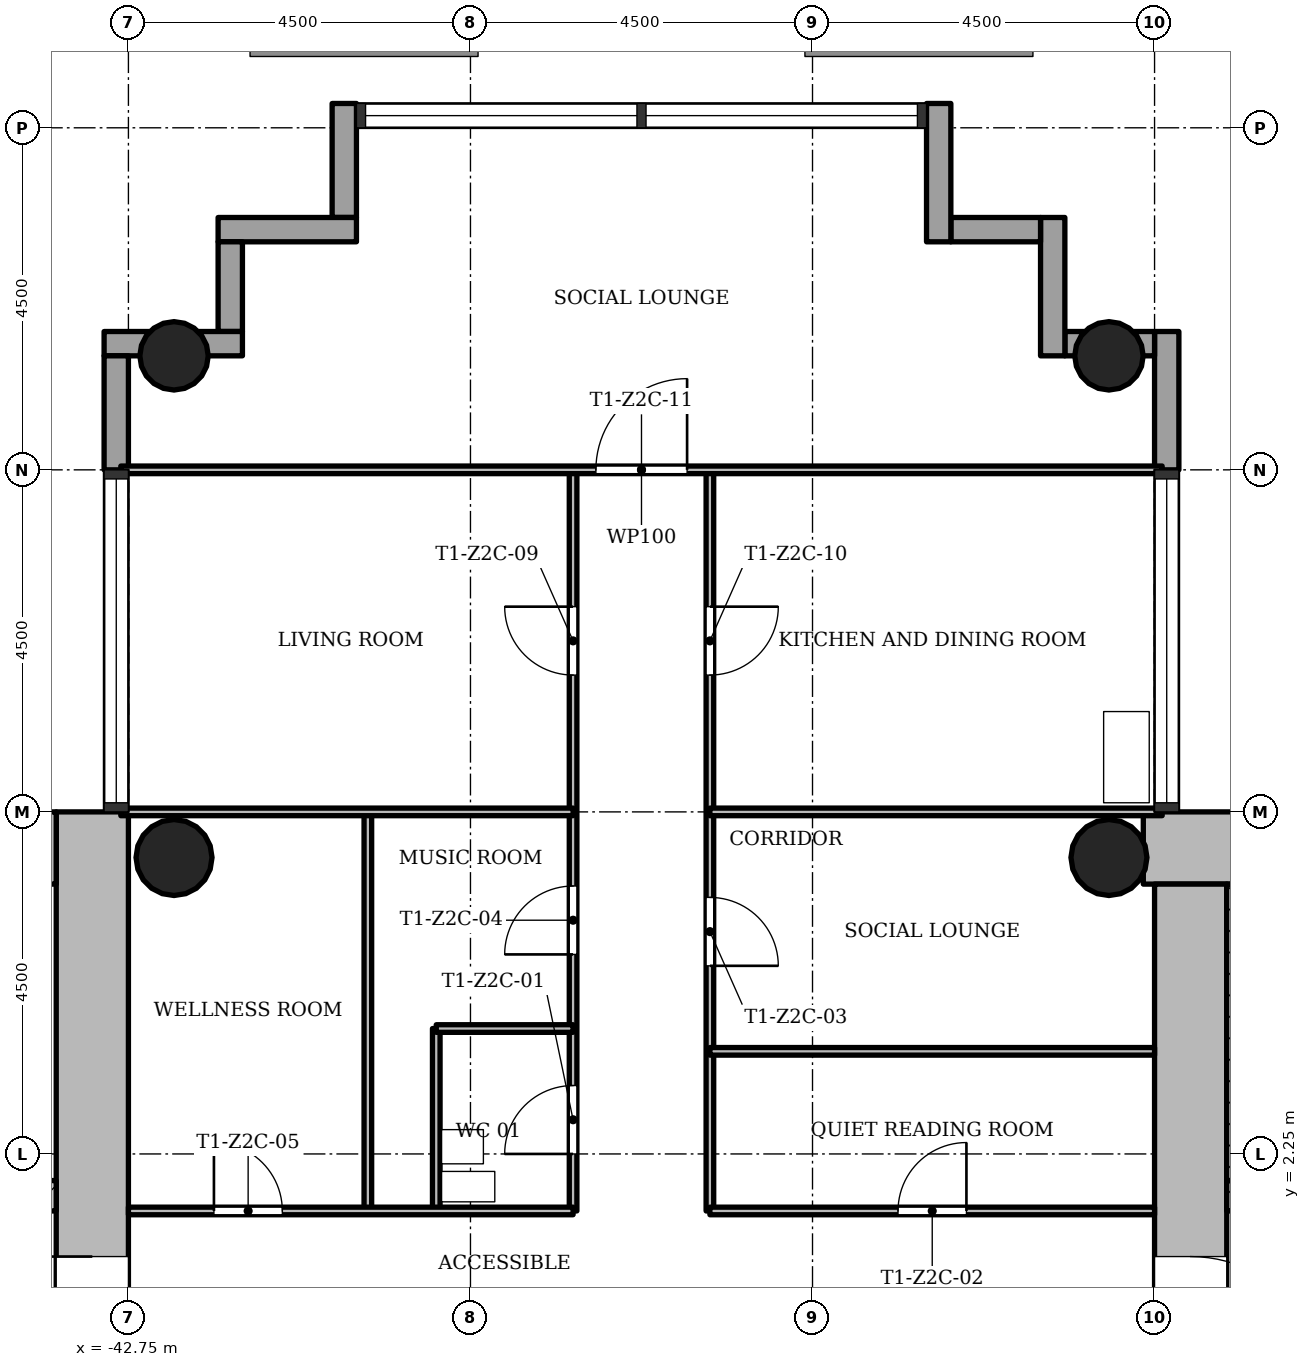
"""IFC4 building model, lengths in metres.
Left out: names, types, materials, properties, quantities, classifications, styles, units other than length and angle.
Written with IfcOpenShell. Run it as: python <this file> out.ifc"""

import sys

from ifc_helpers import new_model, si_unit, direction, frame, frame_2d, origin, origin_2d, place, context, subcontext, project, spatial, rectangle, hollow_circle, extrude, element, fill, save


model = new_model("IFC4")
c1 = context("Model", 3, precision=1e-05, world=origin(), true_north=direction((0.0, 1.0)))
c2 = subcontext(c1, "Body", "Model", "MODEL_VIEW")
j1 = project(units=[si_unit("LENGTHUNIT", "METRE"), si_unit("PLANEANGLEUNIT", "RADIAN")], contexts=[c1])
p1 = place(None, origin())
s1 = spatial("IfcSite", under=j1, at=p1, CompositionType="ELEMENT")
p2 = place(p1, origin())
s2 = spatial("IfcBuilding", under=s1, at=p2, CompositionType="ELEMENT")
p3 = place(p2, frame((0.0, 0.0, 86.8)))
s3 = spatial("IfcBuildingStorey", under=s2, at=p3, CompositionType="ELEMENT", Elevation=86.8)
p4 = place(p3, frame((-20.702, 6.275, 0.0), z_axis=(0.0, 0.0, 1.0), x_axis=(-1.0, 0.0, 0.0)))
e1 = element("IfcWall", 1, at=p4, inside=s3, PredefinedType="SHEAR", context=c2, shape_type="SweptSolid", body=[
    extrude(rectangle(XDim=8.696, YDim=0.95, at=frame_2d((4.348, 0.0))), origin(), (0.0, 0.0, 1.0), 3.4),
])
p5 = place(p3, frame((-28.775, 5.8, 0.0), z_axis=(0.0, 0.0, 1.0), x_axis=(0.0, -1.0, 0.0)))
e2 = element("IfcWall", 2, at=p5, inside=s3, PredefinedType="SHEAR", context=c2, shape_type="SweptSolid", body=[
    extrude(rectangle(XDim=12.55, YDim=0.95, at=frame_2d((6.275, 0.0))), origin(), (0.0, 0.0, 1.0), 3.4),
])
p6 = place(p5, frame((4.9, 0.0, 0.0)))
e3 = element("IfcOpeningElement", 3, at=p6, cuts=e2, PredefinedType="OPENING", context=c2, shape_type="SweptSolid", body=[
    extrude(rectangle(XDim=1.8, YDim=2.1, at=frame_2d((0.9, 1.05))), frame((0.0, 0.485, 0.0), z_axis=(0.0, -1.0, 0.0), x_axis=(1.0, 0.0, 0.0)), (0.0, 0.0, 1.0), 0.97),
])
p7 = place(p3, frame((-28.3, 1.7, 0.0), z_axis=(0.0, 0.0, 1.0), x_axis=(1.0, 0.0, 0.0)))
e4 = element("IfcWall", 4, at=p7, inside=s3, PredefinedType="SHEAR", context=c2, shape_type="SweptSolid", body=[
    extrude(rectangle(XDim=7.1, YDim=0.4, at=frame_2d((3.55, 0.0))), origin(), (0.0, 0.0, 1.0), 3.4),
])
p8 = place(p7, frame((0.7, 0.0, 0.0)))
e5 = element("IfcOpeningElement", 5, at=p8, cuts=e4, PredefinedType="OPENING", context=c2, shape_type="SweptSolid", body=[
    extrude(rectangle(XDim=0.9, YDim=2.1, at=frame_2d((0.45, 1.05))), frame((0.0, 0.21, 0.0), z_axis=(0.0, -1.0, 0.0), x_axis=(1.0, 0.0, 0.0)), (0.0, 0.0, 1.0), 0.42),
])
p9 = place(p3, frame((-43.225, -5.8, 0.0), z_axis=(0.0, 0.0, 1.0), x_axis=(0.0, 1.0, 0.0)))
e6 = element("IfcWall", 6, at=p9, inside=s3, PredefinedType="SHEAR", context=c2, shape_type="SweptSolid", body=[
    extrude(rectangle(XDim=12.55, YDim=0.95, at=frame_2d((6.275, 0.0))), origin(), (0.0, 0.0, 1.0), 3.4),
])
p10 = place(p9, frame((4.9, 0.0, 0.0)))
e7 = element("IfcOpeningElement", 7, at=p10, cuts=e6, PredefinedType="OPENING", context=c2, shape_type="SweptSolid", body=[
    extrude(rectangle(XDim=1.8, YDim=2.1, at=frame_2d((0.9, 1.05))), frame((0.0, 0.485, 0.0), z_axis=(0.0, -1.0, 0.0), x_axis=(1.0, 0.0, 0.0)), (0.0, 0.0, 1.0), 0.97),
])
p11 = place(p3, frame((-43.7, 6.275, 0.0), z_axis=(0.0, 0.0, 1.0), x_axis=(-1.0, 0.0, 0.0)))
e8 = element("IfcWall", 8, at=p11, inside=s3, PredefinedType="SHEAR", context=c2, shape_type="SweptSolid", body=[
    extrude(rectangle(XDim=8.05, YDim=0.95, at=frame_2d((4.025, 0.0))), origin(), (0.0, 0.0, 1.0), 3.4),
])
p12 = place(p3, frame((-50.8, 1.7, 0.0), z_axis=(0.0, 0.0, 1.0), x_axis=(1.0, 0.0, 0.0)))
e9 = element("IfcWall", 9, at=p12, inside=s3, PredefinedType="SHEAR", context=c2, shape_type="SweptSolid", body=[
    extrude(rectangle(XDim=7.1, YDim=0.4, at=frame_2d((3.55, 0.0))), origin(), (0.0, 0.0, 1.0), 3.4),
])
p13 = place(p12, frame((5.2, 0.0, 0.0)))
e10 = element("IfcOpeningElement", 10, at=p13, cuts=e9, PredefinedType="OPENING", context=c2, shape_type="SweptSolid", body=[
    extrude(rectangle(XDim=1.1, YDim=2.1, at=frame_2d((0.55, 1.05))), frame((0.0, 0.21, 0.0), z_axis=(0.0, -1.0, 0.0), x_axis=(1.0, 0.0, 0.0)), (0.0, 0.0, 1.0), 0.42),
])
for number, where, z_axis, x_axis in (
    (11, (-29.85, 12.75, 0.0), (0.0, 0.0, 1.0), (1.0, 0.0, 0.0)),
    (12, (-42.15, 12.75, 0.0), (0.0, 0.0, 1.0), (1.0, 0.0, 0.0)),
):
    element("IfcColumn", number, at=place(p3, frame(where, z_axis=z_axis, x_axis=x_axis)), inside=s3, PredefinedType="COLUMN", context=c2, shape_type="SweptSolid", body=[
        extrude(hollow_circle(Radius=0.45, WallThickness=0.032, at=origin_2d()), origin(), (0.0, 0.0, 1.0), 3.4),
    ])
for number, where, z_axis, x_axis in (
    (13, (-29.85, 6.15, 0.0), (0.0, 0.0, 1.0), (1.0, 0.0, 0.0)),
    (14, (-42.15, 6.15, 0.0), (0.0, 0.0, 1.0), (1.0, 0.0, 0.0)),
):
    element("IfcColumn", number, at=place(p3, frame(where, z_axis=z_axis, x_axis=x_axis)), inside=s3, PredefinedType="COLUMN", context=c2, shape_type="SweptSolid", body=[
        extrude(hollow_circle(Radius=0.5, WallThickness=0.036, at=origin_2d()), origin(), (0.0, 0.0, 1.0), 3.4),
    ])
p14 = place(p3, frame((-29.09, 11.25, -0.3), z_axis=(0.0, 0.0, 1.0), x_axis=(0.0, 1.0, 0.0)))
e15 = element("IfcWall", 15, at=p14, inside=s3, PredefinedType="STANDARD", context=c2, shape_type="SweptSolid", body=[
    extrude(rectangle(XDim=1.82, YDim=0.32, at=frame_2d((0.91, 0.0))), origin(), (0.0, 0.0, 1.0), 3.4),
])
p15 = place(p3, frame((-29.25, 12.91, -0.3), z_axis=(0.0, 0.0, 1.0), x_axis=(-1.0, 0.0, 0.0)))
e16 = element("IfcWall", 16, at=p15, inside=s3, PredefinedType="STANDARD", context=c2, shape_type="SweptSolid", body=[
    extrude(rectangle(XDim=1.18, YDim=0.32, at=frame_2d((0.59, 0.0))), origin(), (0.0, 0.0, 1.0), 3.4),
])
p16 = place(p3, frame((-30.59, 12.75, -0.3), z_axis=(0.0, 0.0, 1.0), x_axis=(0.0, 1.0, 0.0)))
e17 = element("IfcWall", 17, at=p16, inside=s3, PredefinedType="STANDARD", context=c2, shape_type="SweptSolid", body=[
    extrude(rectangle(XDim=1.82, YDim=0.32, at=frame_2d((0.91, 0.0))), origin(), (0.0, 0.0, 1.0), 3.4),
])
p17 = place(p3, frame((-30.75, 14.41, -0.3), z_axis=(0.0, 0.0, 1.0), x_axis=(-1.0, 0.0, 0.0)))
e18 = element("IfcWall", 18, at=p17, inside=s3, PredefinedType="STANDARD", context=c2, shape_type="SweptSolid", body=[
    extrude(rectangle(XDim=1.18, YDim=0.32, at=frame_2d((0.59, 0.0))), origin(), (0.0, 0.0, 1.0), 3.4),
])
p18 = place(p3, frame((-32.09, 14.25, -0.3), z_axis=(0.0, 0.0, 1.0), x_axis=(0.0, 1.0, 0.0)))
e19 = element("IfcWall", 19, at=p18, inside=s3, PredefinedType="STANDARD", context=c2, shape_type="SweptSolid", body=[
    extrude(rectangle(XDim=1.82, YDim=0.32, at=frame_2d((0.91, 0.0))), origin(), (0.0, 0.0, 1.0), 3.4),
])
p19 = place(p3, frame((-39.91, 16.07, -0.3), z_axis=(0.0, 0.0, 1.0), x_axis=(0.0, -1.0, 0.0)))
e20 = element("IfcWall", 20, at=p19, inside=s3, PredefinedType="STANDARD", context=c2, shape_type="SweptSolid", body=[
    extrude(rectangle(XDim=1.5, YDim=0.32, at=frame_2d((0.75, 0.0))), origin(), (0.0, 0.0, 1.0), 3.4),
])
p20 = place(p3, frame((-39.75, 14.41, -0.3), z_axis=(0.0, 0.0, 1.0), x_axis=(-1.0, 0.0, 0.0)))
e21 = element("IfcWall", 21, at=p20, inside=s3, PredefinedType="STANDARD", context=c2, shape_type="SweptSolid", body=[
    extrude(rectangle(XDim=1.82, YDim=0.32, at=frame_2d((0.91, 0.0))), origin(), (0.0, 0.0, 1.0), 3.4),
])
p21 = place(p3, frame((-41.41, 14.25, -0.3), z_axis=(0.0, 0.0, 1.0), x_axis=(0.0, -1.0, 0.0)))
e22 = element("IfcWall", 22, at=p21, inside=s3, PredefinedType="STANDARD", context=c2, shape_type="SweptSolid", body=[
    extrude(rectangle(XDim=1.18, YDim=0.32, at=frame_2d((0.59, 0.0))), origin(), (0.0, 0.0, 1.0), 3.4),
])
p22 = place(p3, frame((-41.25, 12.91, -0.3), z_axis=(0.0, 0.0, 1.0), x_axis=(-1.0, 0.0, 0.0)))
e23 = element("IfcWall", 23, at=p22, inside=s3, PredefinedType="STANDARD", context=c2, shape_type="SweptSolid", body=[
    extrude(rectangle(XDim=1.82, YDim=0.32, at=frame_2d((0.91, 0.0))), origin(), (0.0, 0.0, 1.0), 3.4),
])
p23 = place(p3, frame((-42.91, 12.75, -0.3), z_axis=(0.0, 0.0, 1.0), x_axis=(0.0, -1.0, 0.0)))
e24 = element("IfcWall", 24, at=p23, inside=s3, PredefinedType="STANDARD", context=c2, shape_type="SweptSolid", body=[
    extrude(rectangle(XDim=1.5, YDim=0.32, at=frame_2d((0.75, 0.0))), origin(), (0.0, 0.0, 1.0), 3.4),
])
p24 = place(p3, frame((-39.6, 1.5, 0.0), z_axis=(0.0, 0.0, 1.0), x_axis=(0.0, 1.0, 0.0)))
e25 = element("IfcWall", 25, at=p24, inside=s3, PredefinedType="PARTITIONING", context=c2, shape_type="SweptSolid", body=[
    extrude(rectangle(XDim=5.25, YDim=0.1, at=frame_2d((2.625, 0.0))), origin(), (0.0, 0.0, 1.0), 3.0),
])
p25 = place(p3, frame((-38.7, 1.5, 0.0), z_axis=(0.0, 0.0, 1.0), x_axis=(0.0, 1.0, 0.0)))
e26 = element("IfcWall", 26, at=p25, inside=s3, PredefinedType="PARTITIONING", context=c2, shape_type="SweptSolid", body=[
    extrude(rectangle(XDim=2.4, YDim=0.1, at=frame_2d((1.2, 0.0))), origin(), (0.0, 0.0, 1.0), 3.0),
])
p26 = place(p3, frame((-36.9, 1.5, 0.0), z_axis=(0.0, 0.0, 1.0), x_axis=(0.0, 1.0, 0.0)))
e27 = element("IfcWall", 27, at=p26, inside=s3, PredefinedType="PARTITIONING", context=c2, shape_type="SweptSolid", body=[
    extrude(rectangle(XDim=9.75, YDim=0.1, at=frame_2d((4.875, 0.0))), origin(), (0.0, 0.0, 1.0), 3.0),
])
p27 = place(p26, frame((0.75, 0.0, 0.0)))
e28 = element("IfcOpeningElement", 28, at=p27, cuts=e27, PredefinedType="OPENING", context=c2, shape_type="SweptSolid", body=[
    extrude(rectangle(XDim=0.9, YDim=2.1, at=frame_2d((0.45, 1.05))), frame((0.0, 0.06, 0.0), z_axis=(0.0, -1.0, 0.0), x_axis=(1.0, 0.0, 0.0)), (0.0, 0.0, 1.0), 0.12),
])
p28 = place(p26, frame((3.375, 0.0, 0.0)))
e29 = element("IfcOpeningElement", 29, at=p28, cuts=e27, PredefinedType="OPENING", context=c2, shape_type="SweptSolid", body=[
    extrude(rectangle(XDim=0.9, YDim=2.1, at=frame_2d((0.45, 1.05))), frame((0.0, 0.06, 0.0), z_axis=(0.0, -1.0, 0.0), x_axis=(1.0, 0.0, 0.0)), (0.0, 0.0, 1.0), 0.12),
])
p29 = place(p26, frame((7.05, 0.0, 0.0)))
e30 = element("IfcOpeningElement", 30, at=p29, cuts=e27, PredefinedType="OPENING", context=c2, shape_type="SweptSolid", body=[
    extrude(rectangle(XDim=0.9, YDim=2.1, at=frame_2d((0.45, 1.05))), frame((0.0, 0.06, 0.0), z_axis=(0.0, -1.0, 0.0), x_axis=(1.0, 0.0, 0.0)), (0.0, 0.0, 1.0), 0.12),
])
p30 = place(p3, frame((-35.1, 1.5, 0.0), z_axis=(0.0, 0.0, 1.0), x_axis=(0.0, 1.0, 0.0)))
e31 = element("IfcWall", 31, at=p30, inside=s3, PredefinedType="PARTITIONING", context=c2, shape_type="SweptSolid", body=[
    extrude(rectangle(XDim=9.75, YDim=0.1, at=frame_2d((4.875, 0.0))), origin(), (0.0, 0.0, 1.0), 3.0),
])
p31 = place(p30, frame((3.225, 0.0, 0.0)))
e32 = element("IfcOpeningElement", 32, at=p31, cuts=e31, PredefinedType="OPENING", context=c2, shape_type="SweptSolid", body=[
    extrude(rectangle(XDim=0.9, YDim=2.1, at=frame_2d((0.45, 1.05))), frame((0.0, 0.06, 0.0), z_axis=(0.0, -1.0, 0.0), x_axis=(1.0, 0.0, 0.0)), (0.0, 0.0, 1.0), 0.12),
])
p32 = place(p30, frame((7.05, 0.0, 0.0)))
e33 = element("IfcOpeningElement", 33, at=p32, cuts=e31, PredefinedType="OPENING", context=c2, shape_type="SweptSolid", body=[
    extrude(rectangle(XDim=0.9, YDim=2.1, at=frame_2d((0.45, 1.05))), frame((0.0, 0.06, 0.0), z_axis=(0.0, -1.0, 0.0), x_axis=(1.0, 0.0, 0.0)), (0.0, 0.0, 1.0), 0.12),
])
p33 = place(p3, frame((-42.75, 1.5, 0.0), z_axis=(0.0, 0.0, 1.0), x_axis=(1.0, 0.0, 0.0)))
e34 = element("IfcWall", 34, at=p33, inside=s3, PredefinedType="PARTITIONING", context=c2, shape_type="SweptSolid", body=[
    extrude(rectangle(XDim=5.85, YDim=0.1, at=frame_2d((2.925, 0.0))), origin(), (0.0, 0.0, 1.0), 3.0),
])
p34 = place(p33, frame((1.125, 0.0, 0.0)))
e35 = element("IfcOpeningElement", 35, at=p34, cuts=e34, PredefinedType="OPENING", context=c2, shape_type="SweptSolid", body=[
    extrude(rectangle(XDim=0.9, YDim=2.1, at=frame_2d((0.45, 1.05))), frame((0.0, 0.06, 0.0), z_axis=(0.0, -1.0, 0.0), x_axis=(1.0, 0.0, 0.0)), (0.0, 0.0, 1.0), 0.12),
])
p35 = place(p3, frame((-35.1, 1.5, 0.0), z_axis=(0.0, 0.0, 1.0), x_axis=(1.0, 0.0, 0.0)))
e36 = element("IfcWall", 36, at=p35, inside=s3, PredefinedType="PARTITIONING", context=c2, shape_type="SweptSolid", body=[
    extrude(rectangle(XDim=5.85, YDim=0.1, at=frame_2d((2.925, 0.0))), origin(), (0.0, 0.0, 1.0), 3.0),
])
p36 = place(p35, frame((2.475, 0.0, 0.0)))
e37 = element("IfcOpeningElement", 37, at=p36, cuts=e36, PredefinedType="OPENING", context=c2, shape_type="SweptSolid", body=[
    extrude(rectangle(XDim=0.9, YDim=2.1, at=frame_2d((0.45, 1.05))), frame((0.0, 0.06, 0.0), z_axis=(0.0, -1.0, 0.0), x_axis=(1.0, 0.0, 0.0)), (0.0, 0.0, 1.0), 0.12),
])
p37 = place(p3, frame((-35.1, 3.6, 0.0), z_axis=(0.0, 0.0, 1.0), x_axis=(1.0, 0.0, 0.0)))
e38 = element("IfcWall", 38, at=p37, inside=s3, PredefinedType="PARTITIONING", context=c2, shape_type="SweptSolid", body=[
    extrude(rectangle(XDim=5.85, YDim=0.1, at=frame_2d((2.925, 0.0))), origin(), (0.0, 0.0, 1.0), 3.0),
])
p38 = place(p3, frame((-38.7, 3.9, 0.0), z_axis=(0.0, 0.0, 1.0), x_axis=(1.0, 0.0, 0.0)))
e39 = element("IfcWall", 39, at=p38, inside=s3, PredefinedType="PARTITIONING", context=c2, shape_type="SweptSolid", body=[
    extrude(rectangle(XDim=1.8, YDim=0.1, at=frame_2d((0.9, 0.0))), origin(), (0.0, 0.0, 1.0), 3.0),
])
for number, where, z_axis, x_axis in (
    (40, (-42.85, 6.75, 0.0), (0.0, 0.0, 1.0), (1.0, 0.0, 0.0)),
    (41, (-35.1, 6.75, 0.0), (0.0, 0.0, 1.0), (1.0, 0.0, 0.0)),
):
    element("IfcWall", number, at=place(p3, frame(where, z_axis=z_axis, x_axis=x_axis)), inside=s3, PredefinedType="PARTITIONING", context=c2, shape_type="SweptSolid", body=[
        extrude(rectangle(XDim=5.95, YDim=0.1, at=frame_2d((2.975, 0.0))), origin(), (0.0, 0.0, 1.0), 3.0),
    ])
p39 = place(p3, frame((-42.85, 11.25, 0.0), z_axis=(0.0, 0.0, 1.0), x_axis=(1.0, 0.0, 0.0)))
e42 = element("IfcWall", 42, at=p39, inside=s3, PredefinedType="PARTITIONING", context=c2, shape_type="SweptSolid", body=[
    extrude(rectangle(XDim=13.7, YDim=0.1, at=frame_2d((6.85, 0.0))), origin(), (0.0, 0.0, 1.0), 3.0),
])
p40 = place(p39, frame((6.25, 0.0, 0.0)))
e43 = element("IfcOpeningElement", 43, at=p40, cuts=e42, PredefinedType="OPENING", context=c2, shape_type="SweptSolid", body=[
    extrude(rectangle(XDim=1.2, YDim=2.1, at=frame_2d((0.6, 1.05))), frame((0.0, 0.06, 0.0), z_axis=(0.0, -1.0, 0.0), x_axis=(1.0, 0.0, 0.0)), (0.0, 0.0, 1.0), 0.12),
])
p41 = place(p3, frame((-28.175, 1.9, 0.0), z_axis=(0.0, 0.0, 1.0), x_axis=(0.0, 1.0, 0.0)))
e44 = element("IfcWall", 44, at=p41, inside=s3, PredefinedType="SHEAR", context=c2, shape_type="SweptSolid", body=[
    extrude(rectangle(XDim=3.9, YDim=0.25, at=frame_2d((1.95, 0.0))), origin(), (0.0, 0.0, 1.0), 3.4),
])
p42 = place(p27, origin())
e45 = element("IfcDoor", 45, at=p42, inside=s3, OperationType="SINGLE_SWING_RIGHT", PredefinedType="DOOR", context=c2, shape_type="SweptSolid", body=[
    extrude(rectangle(XDim=0.9, YDim=2.1, at=frame_2d((0.45, 1.05))), frame((0.0, 0.025, 0.0), z_axis=(0.0, -1.0, 0.0), x_axis=(1.0, 0.0, 0.0)), (0.0, 0.0, 1.0), 0.05),
])
fill(e28, e45)
p43 = place(p36, origin())
e46 = element("IfcDoor", 46, at=p43, inside=s3, OperationType="SINGLE_SWING_LEFT", PredefinedType="DOOR", context=c2, shape_type="SweptSolid", body=[
    extrude(rectangle(XDim=0.9, YDim=2.1, at=frame_2d((0.45, 1.05))), frame((0.0, 0.025, 0.0), z_axis=(0.0, -1.0, 0.0), x_axis=(1.0, 0.0, 0.0)), (0.0, 0.0, 1.0), 0.05),
])
fill(e37, e46)
p44 = place(p31, origin())
e47 = element("IfcDoor", 47, at=p44, inside=s3, OperationType="SINGLE_SWING_LEFT", PredefinedType="DOOR", context=c2, shape_type="SweptSolid", body=[
    extrude(rectangle(XDim=0.9, YDim=2.1, at=frame_2d((0.45, 1.05))), frame((0.0, 0.025, 0.0), z_axis=(0.0, -1.0, 0.0), x_axis=(1.0, 0.0, 0.0)), (0.0, 0.0, 1.0), 0.05),
])
fill(e32, e47)
p45 = place(p28, origin())
e48 = element("IfcDoor", 48, at=p45, inside=s3, OperationType="SINGLE_SWING_RIGHT", PredefinedType="DOOR", context=c2, shape_type="SweptSolid", body=[
    extrude(rectangle(XDim=0.9, YDim=2.1, at=frame_2d((0.45, 1.05))), frame((0.0, 0.025, 0.0), z_axis=(0.0, -1.0, 0.0), x_axis=(1.0, 0.0, 0.0)), (0.0, 0.0, 1.0), 0.05),
])
fill(e29, e48)
p46 = place(p34, origin())
e49 = element("IfcDoor", 49, at=p46, inside=s3, OperationType="SINGLE_SWING_RIGHT", PredefinedType="DOOR", context=c2, shape_type="SweptSolid", body=[
    extrude(rectangle(XDim=0.9, YDim=2.1, at=frame_2d((0.45, 1.05))), frame((0.0, 0.025, 0.0), z_axis=(0.0, -1.0, 0.0), x_axis=(1.0, 0.0, 0.0)), (0.0, 0.0, 1.0), 0.05),
])
fill(e35, e49)
p47 = place(p29, origin())
e50 = element("IfcDoor", 50, at=p47, inside=s3, OperationType="SINGLE_SWING_LEFT", PredefinedType="DOOR", context=c2, shape_type="SweptSolid", body=[
    extrude(rectangle(XDim=0.9, YDim=2.1, at=frame_2d((0.45, 1.05))), frame((0.0, 0.025, 0.0), z_axis=(0.0, -1.0, 0.0), x_axis=(1.0, 0.0, 0.0)), (0.0, 0.0, 1.0), 0.05),
])
fill(e30, e50)
p48 = place(p32, origin())
e51 = element("IfcDoor", 51, at=p48, inside=s3, OperationType="SINGLE_SWING_RIGHT", PredefinedType="DOOR", context=c2, shape_type="SweptSolid", body=[
    extrude(rectangle(XDim=0.9, YDim=2.1, at=frame_2d((0.45, 1.05))), frame((0.0, 0.025, 0.0), z_axis=(0.0, -1.0, 0.0), x_axis=(1.0, 0.0, 0.0)), (0.0, 0.0, 1.0), 0.05),
])
fill(e33, e51)
p49 = place(p40, origin())
e52 = element("IfcDoor", 52, at=p49, inside=s3, OperationType="SINGLE_SWING_LEFT", PredefinedType="DOOR", context=c2, shape_type="SweptSolid", body=[
    extrude(rectangle(XDim=1.2, YDim=2.1, at=frame_2d((0.6, 1.05))), frame((0.0, 0.025, 0.0), z_axis=(0.0, -1.0, 0.0), x_axis=(1.0, 0.0, 0.0)), (0.0, 0.0, 1.0), 0.05),
])
fill(e43, e52)
p50 = place(p6, origin())
e53 = element("IfcDoor", 53, at=p50, inside=s3, OperationType="SINGLE_SWING_LEFT", PredefinedType="DOOR", context=c2, shape_type="SweptSolid", body=[
    extrude(rectangle(XDim=1.8, YDim=2.1, at=frame_2d((0.9, 1.05))), frame((0.0, 0.025, 0.0), z_axis=(0.0, -1.0, 0.0), x_axis=(1.0, 0.0, 0.0)), (0.0, 0.0, 1.0), 0.05),
])
fill(e3, e53)
p51 = place(p10, origin())
e54 = element("IfcDoor", 54, at=p51, inside=s3, OperationType="SINGLE_SWING_LEFT", PredefinedType="DOOR", context=c2, shape_type="SweptSolid", body=[
    extrude(rectangle(XDim=1.8, YDim=2.1, at=frame_2d((0.9, 1.05))), frame((0.0, 0.025, 0.0), z_axis=(0.0, -1.0, 0.0), x_axis=(1.0, 0.0, 0.0)), (0.0, 0.0, 1.0), 0.05),
])
fill(e7, e54)
save(model, sys.argv[1])
